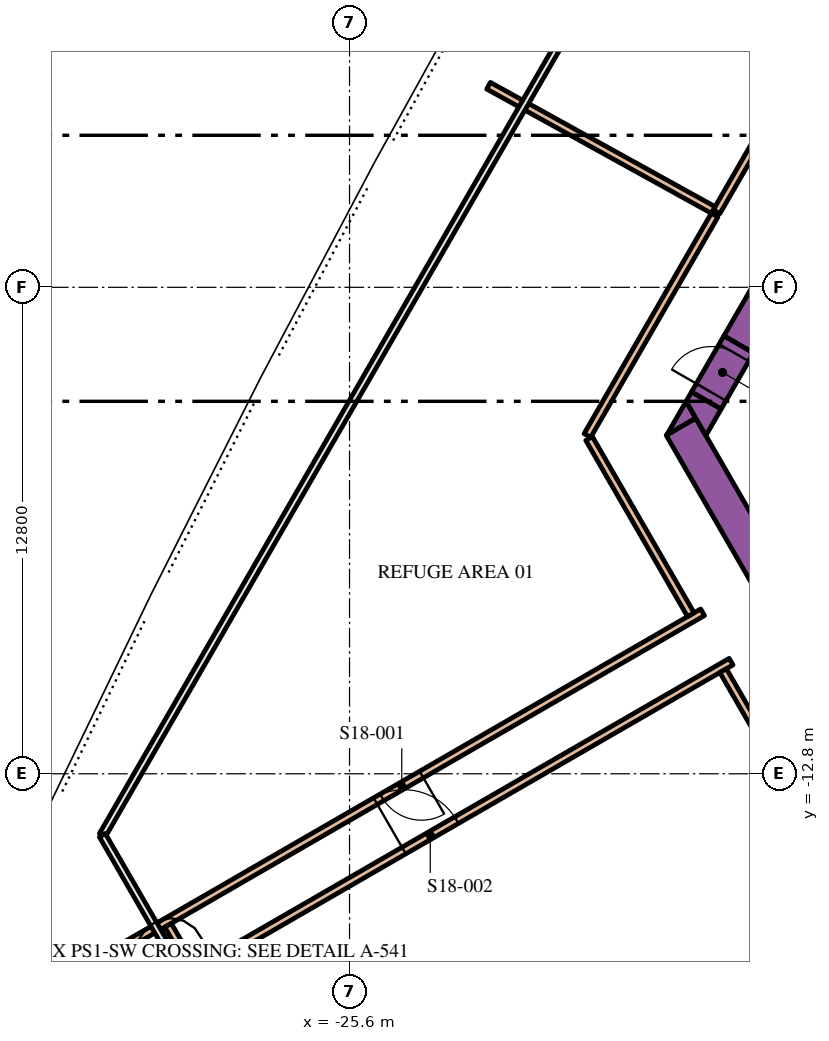
"""IFC4 building model, lengths in metres.
Left out: names, types, materials, properties, quantities, classifications, styles, units other than length and angle.
Written with IfcOpenShell. Run it as: python <this file> out.ifc"""

import sys

from ifc_helpers import new_model, si_unit, direction, frame, frame_2d, origin, place, context, subcontext, project, spatial, polyline, rectangle, outline, extrude, element, fill, save


model = new_model("IFC4")
c1 = context("Model", 3, precision=1e-05, world=origin(), true_north=direction((0.0, 1.0)))
c2 = subcontext(c1, "Body", "Model", "MODEL_VIEW")
j1 = project(units=[si_unit("LENGTHUNIT", "METRE"), si_unit("PLANEANGLEUNIT", "RADIAN")], contexts=[c1])
p1 = place(None, origin())
s1 = spatial("IfcSite", under=j1, at=p1, CompositionType="ELEMENT")
p2 = place(p1, origin())
s2 = spatial("IfcBuilding", under=s1, at=p2, CompositionType="ELEMENT")
p3 = place(p2, frame((0.0, 0.0, 78.3)))
s3 = spatial("IfcBuildingStorey", under=s2, at=p3, CompositionType="ELEMENT", Elevation=78.3)
p4 = place(p3, frame((-15.36, -1.503, 0.0), z_axis=(0.0, 0.0, 1.0), x_axis=(0.50000389221, 0.866023156604, 0.0)))
e1 = element("IfcWall", 1, at=p4, inside=s3, PredefinedType="SOLIDWALL", context=c2, shape_type="SweptSolid", body=[
    extrude(rectangle(XDim=21.0, YDim=0.9, at=frame_2d((10.5, 0.0))), origin(), (0.0, 0.0, 1.0), 5.4),
])
p5 = place(p3, frame((-12.134, -11.883, 0.0), z_axis=(0.0, 0.0, 1.0), x_axis=(-0.500005339912, 0.866022320763, 0.0)))
e2 = element("IfcWall", 2, at=p5, inside=s3, PredefinedType="SOLIDWALL", context=c2, shape_type="SweptSolid", body=[
    extrude(rectangle(XDim=9.488, YDim=0.9, at=frame_2d((4.744, 0.0))), origin(), (0.0, 0.0, 1.0), 5.4),
])
p6 = place(p3, origin())
e3 = element("IfcWall", 3, at=p6, inside=s3, PredefinedType="SOLIDWALL", context=c2, shape_type="SweptSolid", body=[
    extrude(outline(polyline([(-16.489, -3.44), (-17.251, -3.88), (-16.743, -3.0), (-16.489, -3.44)])), origin(), (0.0, 0.0, 1.0), 5.4),
])
e4 = element("IfcWall", 4, at=p6, inside=s3, PredefinedType="SOLIDWALL", context=c2, shape_type="SweptSolid", body=[
    extrude(outline(polyline([(-15.82, -3.201), (-16.223, -3.9), (-16.743, -3.0), (-16.599, -2.751), (-15.82, -3.201)])), origin(), (0.0, 0.0, 1.0), 5.4),
])
p7 = place(p3, frame((-16.209, -2.976, 0.0), z_axis=(0.0, 0.0, 1.0), x_axis=(0.499954529098, 0.86605165483, 0.0)))
e5 = element("IfcWall", 5, at=p7, inside=s3, PredefinedType="SOLIDWALL", context=c2, shape_type="SweptSolid", body=[
    extrude(rectangle(XDim=1.7, YDim=0.9, at=frame_2d((0.85, 0.0))), origin(), (0.0, 0.0, 1.0), 5.4),
])
p8 = place(p7, frame((0.25, 0.0, 0.0)))
e6 = element("IfcOpeningElement", 6, at=p8, cuts=e5, PredefinedType="OPENING", context=c2, shape_type="SweptSolid", body=[
    extrude(rectangle(XDim=1.2, YDim=2.1, at=frame_2d((0.6, 1.05))), frame((0.0, 0.46, 0.0), z_axis=(0.0, -1.0, 0.0), x_axis=(1.0, 0.0, 0.0)), (0.0, 0.0, 1.0), 0.92),
])
p9 = place(p3, frame((-31.391, -18.99, 0.0), z_axis=(0.0, 0.0, 1.0), x_axis=(0.866027012652, 0.49999721335, 0.0)))
e7 = element("IfcWall", 7, at=p9, inside=s3, PredefinedType="PARTITIONING", context=c2, shape_type="SweptSolid", body=[
    extrude(rectangle(XDim=18.28, YDim=0.2, at=frame_2d((9.14, 0.0))), origin(), (0.0, 0.0, 1.0), 4.25),
])
p10 = place(p9, frame((8.34, 0.0, 0.0)))
e8 = element("IfcOpeningElement", 8, at=p10, cuts=e7, PredefinedType="OPENING", context=c2, shape_type="SweptSolid", body=[
    extrude(rectangle(XDim=1.6, YDim=2.1, at=frame_2d((0.8, 1.05))), frame((0.0, 0.11, 0.0), z_axis=(0.0, -1.0, 0.0), x_axis=(1.0, 0.0, 0.0)), (0.0, 0.0, 1.0), 0.22),
])
p11 = place(p3, frame((-16.31, -8.551, 0.0), z_axis=(0.0, 0.0, 1.0), x_axis=(-0.866027012652, -0.49999721335, 0.0)))
e9 = element("IfcWall", 9, at=p11, inside=s3, PredefinedType="PARTITIONING", context=c2, shape_type="SweptSolid", body=[
    extrude(rectangle(XDim=18.28, YDim=0.2, at=frame_2d((9.14, 0.0))), origin(), (0.0, 0.0, 1.0), 4.25),
])
p12 = place(p11, frame((8.54, 0.0, 0.0)))
e10 = element("IfcOpeningElement", 10, at=p12, cuts=e9, PredefinedType="OPENING", context=c2, shape_type="SweptSolid", body=[
    extrude(rectangle(XDim=1.2, YDim=2.1, at=frame_2d((0.6, 1.05))), frame((0.0, 0.11, 0.0), z_axis=(0.0, -1.0, 0.0), x_axis=(1.0, 0.0, 0.0)), (0.0, 0.0, 1.0), 0.22),
])
p13 = place(p3, frame((-9.692, 12.813, 0.0), z_axis=(0.0, 0.0, 1.0), x_axis=(-0.499991245628, -0.866030458065, 0.0)))
e11 = element("IfcWall", 11, at=p13, inside=s3, PredefinedType="PARTITIONING", context=c2, shape_type="SweptSolid", body=[
    extrude(rectangle(XDim=12.501, YDim=0.2, at=frame_2d((6.25, 0.0))), origin(), (0.0, 0.0, 1.0), 4.25),
])
p14 = place(p13, frame((5.651, 0.0, 0.0)))
e12 = element("IfcOpeningElement", 12, at=p14, cuts=e11, PredefinedType="OPENING", context=c2, shape_type="SweptSolid", body=[
    extrude(rectangle(XDim=1.2, YDim=2.1, at=frame_2d((0.6, 1.05))), frame((0.0, 0.11, 0.0), z_axis=(0.0, -1.0, 0.0), x_axis=(1.0, 0.0, 0.0)), (0.0, 0.0, 1.0), 0.22),
])
p15 = place(p3, frame((-21.942, 5.304, 0.0), z_axis=(0.0, 0.0, 1.0), x_axis=(0.875134013618, -0.483880623924, 0.0)))
e13 = element("IfcWall", 13, at=p15, inside=s3, PredefinedType="PARTITIONING", context=c2, shape_type="SweptSolid", body=[
    extrude(rectangle(XDim=6.755, YDim=0.2, at=frame_2d((3.378, 0.0))), origin(), (0.0, 0.0, 1.0), 4.25),
])
p16 = place(p3, frame((-19.341, -3.9, 0.0), z_axis=(0.0, 0.0, 1.0), x_axis=(0.500035875758, 0.866004689915, 0.0)))
e14 = element("IfcWall", 14, at=p16, inside=s3, PredefinedType="PARTITIONING", context=c2, shape_type="SweptSolid", body=[
    extrude(rectangle(XDim=6.698, YDim=0.2, at=frame_2d((3.349, 0.0))), origin(), (0.0, 0.0, 1.0), 4.25),
])
for number, where, z_axis, x_axis in (
    (15, (-16.62, -8.614, 0.0), (0.0, 0.0, 1.0), (-0.5, 0.866, 0.0)),
    (16, (-13.093, -14.722, 0.0), (0.0, 0.0, 1.0), (-0.5, 0.866, 0.0)),
):
    element("IfcWall", number, at=place(p3, frame(where, z_axis=z_axis, x_axis=x_axis)), inside=s3, PredefinedType="PARTITIONING", context=c2, shape_type="SweptSolid", body=[
        extrude(rectangle(XDim=5.353, YDim=0.2, at=frame_2d((2.677, 0.0))), origin(), (0.0, 0.0, 1.0), 4.25),
    ])
p17 = place(p3, frame((-30.118, -17.232, 0.0), z_axis=(0.0, 0.0, 1.0), x_axis=(-0.500325048718, 0.865837655467, 0.0)))
e17 = element("IfcWall", 17, at=p17, inside=s3, PredefinedType="PARTITIONING", context=c2, shape_type="SweptSolid", body=[
    extrude(rectangle(XDim=0.514, YDim=0.2, at=frame_2d((0.257, 0.0))), origin(), (0.0, 0.0, 1.0), 4.25),
])
p18 = place(p8, origin())
e18 = element("IfcDoor", 18, at=p18, inside=s3, OperationType="SINGLE_SWING_LEFT", PredefinedType="DOOR", context=c2, shape_type="SweptSolid", body=[
    extrude(rectangle(XDim=1.2, YDim=2.1, at=frame_2d((0.6, 1.05))), frame((0.0, 0.025, 0.0), z_axis=(0.0, -1.0, 0.0), x_axis=(1.0, 0.0, 0.0)), (0.0, 0.0, 1.0), 0.05),
])
fill(e6, e18)
p19 = place(p12, origin())
e19 = element("IfcDoor", 19, at=p19, inside=s3, OperationType="SINGLE_SWING_RIGHT", PredefinedType="DOOR", context=c2, shape_type="SweptSolid", body=[
    extrude(rectangle(XDim=1.2, YDim=2.1, at=frame_2d((0.6, 1.05))), frame((0.0, 0.025, 0.0), z_axis=(0.0, -1.0, 0.0), x_axis=(1.0, 0.0, 0.0)), (0.0, 0.0, 1.0), 0.05),
])
fill(e10, e19)
p20 = place(p10, origin())
e20 = element("IfcDoor", 20, at=p20, inside=s3, OperationType="DOUBLE_DOOR_SINGLE_SWING", PredefinedType="DOOR", context=c2, shape_type="SweptSolid", body=[
    extrude(rectangle(XDim=1.6, YDim=2.1, at=frame_2d((0.8, 1.05))), frame((0.0, 0.025, 0.0), z_axis=(0.0, -1.0, 0.0), x_axis=(1.0, 0.0, 0.0)), (0.0, 0.0, 1.0), 0.05),
])
fill(e8, e20)
save(model, sys.argv[1])
